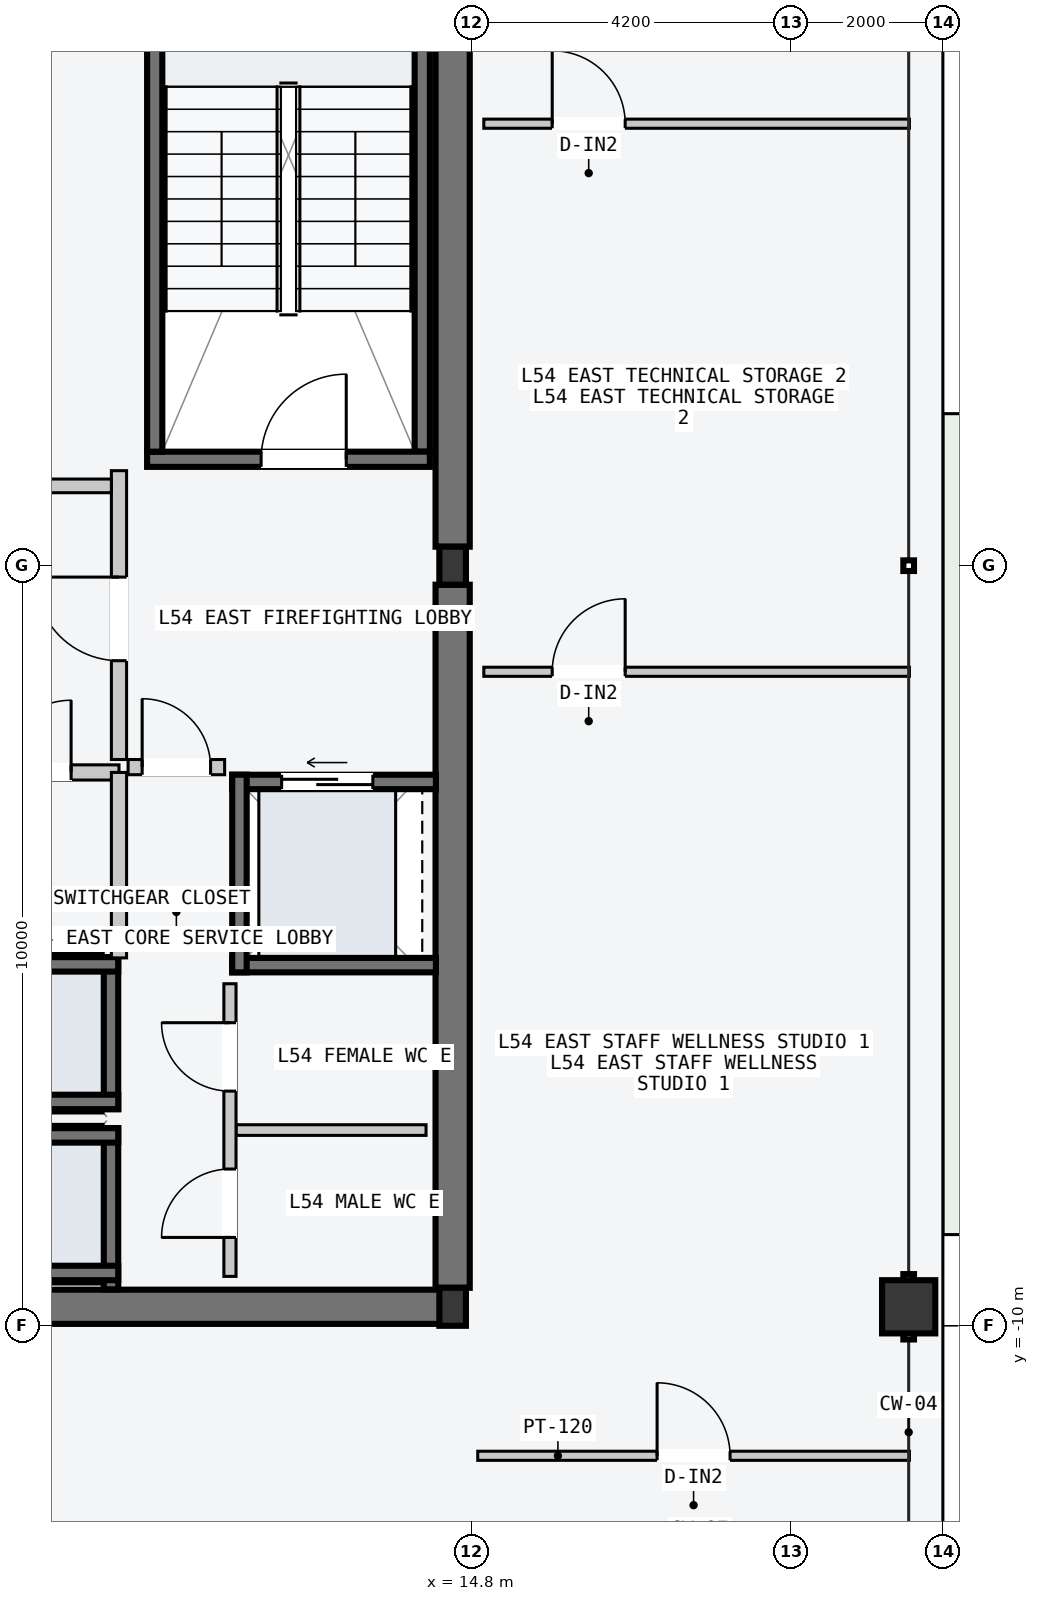
"""IFC4 building model, lengths in metres.
Left out: names, types, materials, properties, quantities, classifications, styles, units other than length and angle.
Written with IfcOpenShell. Run it as: python <this file> out.ifc"""

import sys

from ifc_helpers import new_model, si_unit, direction, frame, frame_2d, origin, origin_2d, place, context, subcontext, project, spatial, rectangle, hollow_rectangle, i_section, extrude, element, fill, save


model = new_model("IFC4")
c1 = context("Model", 3, precision=1e-05, world=origin(), true_north=direction((0.0, 1.0)))
c2 = subcontext(c1, "Body", "Model", "MODEL_VIEW")
j1 = project(units=[si_unit("LENGTHUNIT", "METRE"), si_unit("PLANEANGLEUNIT", "RADIAN")], contexts=[c1])
p1 = place(None, origin())
s1 = spatial("IfcSite", under=j1, at=p1, CompositionType="ELEMENT")
p2 = place(p1, origin())
s2 = spatial("IfcBuilding", under=s1, at=p2, CompositionType="ELEMENT")
p3 = place(p2, frame((0.0, 0.0, 205.5)))
s3 = spatial("IfcBuildingStorey", under=s2, at=p3, CompositionType="ELEMENT", Elevation=205.5)
p4 = place(p3, frame((8.07, -9.75, -0.2), z_axis=(0.0, 0.0, 1.0), x_axis=(1.0, 0.0, 0.0)))
e1 = element("IfcWall", 1, at=p4, inside=s3, PredefinedType="SHEAR", context=c2, shape_type="SweptSolid", body=[
    extrude(rectangle(XDim=6.46, YDim=0.45, at=frame_2d((3.23, 0.0))), origin(), (0.0, 0.0, 1.0), 3.6),
])
for number, where, z_axis, x_axis in (
    (2, (14.55, -9.5, -0.2), (0.0, 0.0, 1.0), (0.0, 1.0, 0.0)),
    (3, (14.55, 0.25, -0.2), (0.0, 0.0, 1.0), (0.0, 1.0, 0.0)),
):
    element("IfcWall", number, at=place(p3, frame(where, z_axis=z_axis, x_axis=x_axis)), inside=s3, PredefinedType="SHEAR", context=c2, shape_type="SweptSolid", body=[
        extrude(rectangle(XDim=9.25, YDim=0.45, at=frame_2d((4.625, 0.0))), origin(), (0.0, 0.0, 1.0), 3.6),
    ])
p5 = place(p3, frame((14.15, 1.5, -0.2), z_axis=(0.0, 0.0, 1.0), x_axis=(0.0, 1.0, 0.0)))
e4 = element("IfcWall", 4, at=p5, inside=s3, PredefinedType="SOLIDWALL", context=c2, shape_type="SweptSolid", body=[
    extrude(rectangle(XDim=7.8, YDim=0.2, at=frame_2d((3.9, 0.0))), origin(), (0.0, 0.0, 1.0), 3.6),
])
p6 = place(p3, frame((10.53, 1.4, -0.2), z_axis=(0.0, 0.0, 1.0), x_axis=(1.0, 0.0, 0.0)))
e5 = element("IfcWall", 5, at=p6, inside=s3, PredefinedType="SOLIDWALL", context=c2, shape_type="SweptSolid", body=[
    extrude(rectangle(XDim=3.72, YDim=0.2, at=frame_2d((1.86, 0.0))), origin(), (0.0, 0.0, 1.0), 3.6),
])
p7 = place(p6, frame((1.5, 0.0, 0.2)))
e6 = element("IfcOpeningElement", 6, at=p7, cuts=e5, PredefinedType="OPENING", context=c2, shape_type="SweptSolid", body=[
    extrude(rectangle(XDim=1.12, YDim=2.18, at=frame_2d((0.56, 1.09))), frame((0.0, 0.11, 0.0), z_axis=(0.0, -1.0, 0.0), x_axis=(1.0, 0.0, 0.0)), (0.0, 0.0, 1.0), 0.22),
])
p8 = place(p3, frame((10.63, 1.5, -0.2), z_axis=(0.0, 0.0, 1.0), x_axis=(0.0, 1.0, 0.0)))
e7 = element("IfcWall", 7, at=p8, inside=s3, PredefinedType="SOLIDWALL", context=c2, shape_type="SweptSolid", body=[
    extrude(rectangle(XDim=7.8, YDim=0.2, at=frame_2d((3.9, 0.0))), origin(), (0.0, 0.0, 1.0), 3.6),
])
for number, where, z_axis, x_axis in (
    (8, (14.55, -9.75, 0.0), (0.0, 0.0, 1.0), (1.0, 0.0, 0.0)),
    (9, (14.55, 0.0, 0.0), (0.0, 0.0, 1.0), (1.0, 0.0, 0.0)),
):
    element("IfcColumn", number, at=place(p3, frame(where, z_axis=z_axis, x_axis=x_axis)), inside=s3, PredefinedType="COLUMN", context=c2, shape_type="SweptSolid", body=[
        extrude(i_section(OverallWidth=0.35, OverallDepth=0.5, WebThickness=0.02, FlangeThickness=0.032, at=origin_2d()), origin(), (0.0, 0.0, 1.0), 3.6),
    ])
p9 = place(p3, frame((20.55, -9.75, 0.0), z_axis=(0.0, 0.0, 1.0), x_axis=(0.0, 1.0, 0.0)))
e10 = element("IfcColumn", 10, at=p9, inside=s3, PredefinedType="COLUMN", context=c2, shape_type="SweptSolid", body=[
    extrude(hollow_rectangle(XDim=0.7, YDim=0.7, WallThickness=0.03, at=origin_2d()), origin(), (0.0, 0.0, 1.0), 3.6),
])
p10 = place(p3, frame((10.055, -9.52, -0.2), z_axis=(0.0, 0.0, 1.0), x_axis=(0.0, 1.0, 0.0)))
e11 = element("IfcWall", 11, at=p10, inside=s3, PredefinedType="SOLIDWALL", context=c2, shape_type="SweptSolid", body=[
    extrude(rectangle(XDim=2.12, YDim=0.19, at=frame_2d((1.06, 0.0))), origin(), (0.0, 0.0, 1.0), 3.6),
])
for number, where, z_axis, x_axis in (
    (12, (7.95, -7.495, -0.2), (0.0, 0.0, 1.0), (1.0, 0.0, 0.0)),
    (13, (7.95, -9.305, -0.2), (0.0, 0.0, 1.0), (1.0, 0.0, 0.0)),
):
    element("IfcWall", number, at=place(p3, frame(where, z_axis=z_axis, x_axis=x_axis)), inside=s3, PredefinedType="SOLIDWALL", context=c2, shape_type="SweptSolid", body=[
        extrude(rectangle(XDim=2.2, YDim=0.19, at=frame_2d((1.1, 0.0))), origin(), (0.0, 0.0, 1.0), 3.6),
    ])
p11 = place(p3, frame((10.055, -7.15, -0.2), z_axis=(0.0, 0.0, 1.0), x_axis=(0.0, 1.0, 0.0)))
e14 = element("IfcWall", 14, at=p11, inside=s3, PredefinedType="SOLIDWALL", context=c2, shape_type="SweptSolid", body=[
    extrude(rectangle(XDim=2.0, YDim=0.19, at=frame_2d((1.0, 0.0))), origin(), (0.0, 0.0, 1.0), 3.6),
])
for number, where, z_axis, x_axis in (
    (15, (7.95, -5.245, -0.2), (0.0, 0.0, 1.0), (1.0, 0.0, 0.0)),
    (16, (7.95, -7.055, -0.2), (0.0, 0.0, 1.0), (1.0, 0.0, 0.0)),
):
    element("IfcWall", number, at=place(p3, frame(where, z_axis=z_axis, x_axis=x_axis)), inside=s3, PredefinedType="SOLIDWALL", context=c2, shape_type="SweptSolid", body=[
        extrude(rectangle(XDim=2.2, YDim=0.19, at=frame_2d((1.1, 0.0))), origin(), (0.0, 0.0, 1.0), 3.6),
    ])
p12 = place(p3, frame((11.65, -2.845, -0.2), z_axis=(0.0, 0.0, 1.0), x_axis=(1.0, 0.0, 0.0)))
e17 = element("IfcWall", 17, at=p12, inside=s3, PredefinedType="SOLIDWALL", context=c2, shape_type="SweptSolid", body=[
    extrude(rectangle(XDim=2.68, YDim=0.19, at=frame_2d((1.34, 0.0))), origin(), (0.0, 0.0, 1.0), 3.6),
])
p13 = place(p12, frame((0.65, 0.0, 0.2)))
e18 = element("IfcOpeningElement", 18, at=p13, cuts=e17, PredefinedType="OPENING", context=c2, shape_type="SweptSolid", body=[
    extrude(rectangle(XDim=1.2, YDim=2.2, at=frame_2d((0.6, 1.1))), frame((0.0, 0.105, 0.0), z_axis=(0.0, -1.0, 0.0), x_axis=(1.0, 0.0, 0.0)), (0.0, 0.0, 1.0), 0.21),
])
p14 = place(p3, frame((11.65, -5.255, -0.2), z_axis=(0.0, 0.0, 1.0), x_axis=(1.0, 0.0, 0.0)))
e19 = element("IfcWall", 19, at=p14, inside=s3, PredefinedType="SOLIDWALL", context=c2, shape_type="SweptSolid", body=[
    extrude(rectangle(XDim=2.68, YDim=0.19, at=frame_2d((1.34, 0.0))), origin(), (0.0, 0.0, 1.0), 3.6),
])
p15 = place(p3, frame((11.745, -5.35, -0.2), z_axis=(0.0, 0.0, 1.0), x_axis=(0.0, 1.0, 0.0)))
e20 = element("IfcWall", 20, at=p15, inside=s3, PredefinedType="SOLIDWALL", context=c2, shape_type="SweptSolid", body=[
    extrude(rectangle(XDim=2.6, YDim=0.19, at=frame_2d((1.3, 0.0))), origin(), (0.0, 0.0, 1.0), 3.6),
])
p16 = place(p3, frame((10.16, -2.55, 0.0), z_axis=(0.0, 0.0, 1.0), x_axis=(0.0, 1.0, 0.0)))
e21 = element("IfcWall", 21, at=p16, inside=s3, PredefinedType="PARTITIONING", context=c2, shape_type="SweptSolid", body=[
    extrude(rectangle(XDim=3.8, YDim=0.2, at=frame_2d((1.9, 0.0))), origin(), (0.0, 0.0, 1.0), 3.4),
])
p17 = place(p16, frame((1.3, 0.0, 0.0)))
e22 = element("IfcOpeningElement", 22, at=p17, cuts=e21, PredefinedType="OPENING", context=c2, shape_type="SweptSolid", body=[
    extrude(rectangle(XDim=1.1, YDim=2.15, at=frame_2d((0.55, 1.075))), frame((0.0, 0.11, 0.0), z_axis=(0.0, -1.0, 0.0), x_axis=(1.0, 0.0, 0.0)), (0.0, 0.0, 1.0), 0.22),
])
p18 = place(p3, frame((10.28, -2.65, 0.0), z_axis=(0.0, 0.0, 1.0), x_axis=(1.0, 0.0, 0.0)))
e23 = element("IfcWall", 23, at=p18, inside=s3, PredefinedType="PARTITIONING", context=c2, shape_type="SweptSolid", body=[
    extrude(rectangle(XDim=1.27, YDim=0.2, at=frame_2d((0.635, 0.0))), origin(), (0.0, 0.0, 1.0), 3.4),
])
p19 = place(p18, frame((0.185, 0.0, 0.0)))
e24 = element("IfcOpeningElement", 24, at=p19, cuts=e23, PredefinedType="OPENING", context=c2, shape_type="SweptSolid", body=[
    extrude(rectangle(XDim=0.9, YDim=2.15, at=frame_2d((0.45, 1.075))), frame((0.0, 0.11, 0.0), z_axis=(0.0, -1.0, 0.0), x_axis=(1.0, 0.0, 0.0)), (0.0, 0.0, 1.0), 0.22),
])
p20 = place(p3, frame((7.96, -2.72, 0.0), z_axis=(0.0, 0.0, 1.0), x_axis=(1.0, 0.0, 0.0)))
e25 = element("IfcWall", 25, at=p20, inside=s3, PredefinedType="PARTITIONING", context=c2, shape_type="SweptSolid", body=[
    extrude(rectangle(XDim=2.2, YDim=0.2, at=frame_2d((1.1, 0.0))), origin(), (0.0, 0.0, 1.0), 3.4),
])
p21 = place(p20, frame((0.62, 0.0, 0.0)))
e26 = element("IfcOpeningElement", 26, at=p21, cuts=e25, PredefinedType="OPENING", context=c2, shape_type="SweptSolid", body=[
    extrude(rectangle(XDim=0.95, YDim=2.1, at=frame_2d((0.475, 1.05))), frame((0.0, 0.11, 0.0), z_axis=(0.0, -1.0, 0.0), x_axis=(1.0, 0.0, 0.0)), (0.0, 0.0, 1.0), 0.22),
])
p22 = place(p3, frame((10.16, -5.16, 0.0), z_axis=(0.0, 0.0, 1.0), x_axis=(0.0, 1.0, 0.0)))
e27 = element("IfcWall", 27, at=p22, inside=s3, PredefinedType="PARTITIONING", context=c2, shape_type="SweptSolid", body=[
    extrude(rectangle(XDim=2.44, YDim=0.2, at=frame_2d((1.22, 0.0))), origin(), (0.0, 0.0, 1.0), 3.4),
])
p23 = place(p3, frame((11.7, -7.425, 0.0), z_axis=(0.0, 0.0, 1.0), x_axis=(1.0, 0.0, 0.0)))
e28 = element("IfcWall", 28, at=p23, inside=s3, PredefinedType="PARTITIONING", context=c2, shape_type="SweptSolid", body=[
    extrude(rectangle(XDim=2.5, YDim=0.14, at=frame_2d((1.25, 0.0))), origin(), (0.0, 0.0, 1.0), 3.4),
])
p24 = place(p3, frame((11.62, -9.35, 0.0), z_axis=(0.0, 0.0, 1.0), x_axis=(0.0, 1.0, 0.0)))
e29 = element("IfcWall", 29, at=p24, inside=s3, PredefinedType="PARTITIONING", context=c2, shape_type="SweptSolid", body=[
    extrude(rectangle(XDim=3.85, YDim=0.16, at=frame_2d((1.925, 0.0))), origin(), (0.0, 0.0, 1.0), 3.4),
])
p25 = place(p24, frame((0.512, 0.0, 0.0)))
e30 = element("IfcOpeningElement", 30, at=p25, cuts=e29, PredefinedType="OPENING", context=c2, shape_type="SweptSolid", body=[
    extrude(rectangle(XDim=0.9, YDim=2.15, at=frame_2d((0.45, 1.075))), frame((0.0, 0.09, 0.0), z_axis=(0.0, -1.0, 0.0), x_axis=(1.0, 0.0, 0.0)), (0.0, 0.0, 1.0), 0.18),
])
p26 = place(p24, frame((2.438, 0.0, 0.0)))
e31 = element("IfcOpeningElement", 31, at=p26, cuts=e29, PredefinedType="OPENING", context=c2, shape_type="SweptSolid", body=[
    extrude(rectangle(XDim=0.9, YDim=2.15, at=frame_2d((0.45, 1.075))), frame((0.0, 0.09, 0.0), z_axis=(0.0, -1.0, 0.0), x_axis=(1.0, 0.0, 0.0)), (0.0, 0.0, 1.0), 0.18),
])
p27 = place(p3, frame((1.26, 1.05, 0.0), z_axis=(0.0, 0.0, 1.0), x_axis=(1.0, 0.0, 0.0)))
e32 = element("IfcWall", 32, at=p27, inside=s3, PredefinedType="PARTITIONING", context=c2, shape_type="SweptSolid", body=[
    extrude(rectangle(XDim=8.8, YDim=0.18, at=frame_2d((4.4, 0.0))), origin(), (0.0, 0.0, 1.0), 3.4),
])
p28 = place(p3, frame((14.88, -11.71, 0.0), z_axis=(0.0, 0.0, 1.0), x_axis=(1.0, 0.0, 0.0)))
e33 = element("IfcWall", 33, at=p28, inside=s3, PredefinedType="PARTITIONING", context=c2, shape_type="SweptSolid", body=[
    extrude(rectangle(XDim=5.68, YDim=0.12, at=frame_2d((2.84, 0.0))), origin(), (0.0, 0.0, 1.0), 3.4),
])
p29 = place(p28, frame((2.36, 0.0, 0.0)))
e34 = element("IfcOpeningElement", 34, at=p29, cuts=e33, PredefinedType="OPENING", context=c2, shape_type="SweptSolid", body=[
    extrude(rectangle(XDim=0.96, YDim=2.18, at=frame_2d((0.48, 1.09))), frame((0.0, 0.07, 0.0), z_axis=(0.0, -1.0, 0.0), x_axis=(1.0, 0.0, 0.0)), (0.0, 0.0, 1.0), 0.14),
])
p30 = place(p3, frame((14.96, -1.396, 0.0), z_axis=(0.0, 0.0, 1.0), x_axis=(1.0, 0.0, 0.0)))
e35 = element("IfcWall", 35, at=p30, inside=s3, PredefinedType="PARTITIONING", context=c2, shape_type="SweptSolid", body=[
    extrude(rectangle(XDim=5.6, YDim=0.12, at=frame_2d((2.8, 0.0))), origin(), (0.0, 0.0, 1.0), 3.4),
])
p31 = place(p30, frame((0.9, 0.0, 0.0)))
e36 = element("IfcOpeningElement", 36, at=p31, cuts=e35, PredefinedType="OPENING", context=c2, shape_type="SweptSolid", body=[
    extrude(rectangle(XDim=0.96, YDim=2.18, at=frame_2d((0.48, 1.09))), frame((0.0, 0.07, 0.0), z_axis=(0.0, -1.0, 0.0), x_axis=(1.0, 0.0, 0.0)), (0.0, 0.0, 1.0), 0.14),
])
p32 = place(p3, frame((14.96, 5.815, 0.0), z_axis=(0.0, 0.0, 1.0), x_axis=(1.0, 0.0, 0.0)))
e37 = element("IfcWall", 37, at=p32, inside=s3, PredefinedType="PARTITIONING", context=c2, shape_type="SweptSolid", body=[
    extrude(rectangle(XDim=5.6, YDim=0.12, at=frame_2d((2.8, 0.0))), origin(), (0.0, 0.0, 1.0), 3.4),
])
p33 = place(p32, frame((0.9, 0.0, 0.0)))
e38 = element("IfcOpeningElement", 38, at=p33, cuts=e37, PredefinedType="OPENING", context=c2, shape_type="SweptSolid", body=[
    extrude(rectangle(XDim=0.96, YDim=2.18, at=frame_2d((0.48, 1.09))), frame((0.0, 0.07, 0.0), z_axis=(0.0, -1.0, 0.0), x_axis=(1.0, 0.0, 0.0)), (0.0, 0.0, 1.0), 0.14),
])
p34 = place(p7, origin())
e39 = element("IfcDoor", 39, at=p34, inside=s3, OperationType="SINGLE_SWING_RIGHT", PredefinedType="DOOR", context=c2, shape_type="SweptSolid", body=[
    extrude(rectangle(XDim=1.12, YDim=2.18, at=frame_2d((0.56, 1.09))), frame((0.0, 0.025, 0.0), z_axis=(0.0, -1.0, 0.0), x_axis=(1.0, 0.0, 0.0)), (0.0, 0.0, 1.0), 0.05),
])
fill(e6, e39)
p35 = place(p13, origin())
e40 = element("IfcDoor", 40, at=p35, inside=s3, OperationType="SLIDING_TO_LEFT", PredefinedType="DOOR", context=c2, shape_type="SweptSolid", body=[
    extrude(rectangle(XDim=1.2, YDim=2.2, at=frame_2d((0.6, 1.1))), frame((0.0, 0.025, 0.0), z_axis=(0.0, -1.0, 0.0), x_axis=(1.0, 0.0, 0.0)), (0.0, 0.0, 1.0), 0.05),
])
fill(e18, e40)
p36 = place(p17, origin())
e41 = element("IfcDoor", 41, at=p36, inside=s3, OperationType="SINGLE_SWING_RIGHT", PredefinedType="DOOR", context=c2, shape_type="SweptSolid", body=[
    extrude(rectangle(XDim=1.1, YDim=2.15, at=frame_2d((0.55, 1.075))), frame((0.0, 0.025, 0.0), z_axis=(0.0, -1.0, 0.0), x_axis=(1.0, 0.0, 0.0)), (0.0, 0.0, 1.0), 0.05),
])
fill(e22, e41)
p37 = place(p19, origin())
e42 = element("IfcDoor", 42, at=p37, inside=s3, OperationType="SINGLE_SWING_LEFT", PredefinedType="DOOR", context=c2, shape_type="SweptSolid", body=[
    extrude(rectangle(XDim=0.9, YDim=2.15, at=frame_2d((0.45, 1.075))), frame((0.0, 0.025, 0.0), z_axis=(0.0, -1.0, 0.0), x_axis=(1.0, 0.0, 0.0)), (0.0, 0.0, 1.0), 0.05),
])
fill(e24, e42)
p38 = place(p21, origin())
e43 = element("IfcDoor", 43, at=p38, inside=s3, OperationType="SINGLE_SWING_RIGHT", PredefinedType="DOOR", context=c2, shape_type="SweptSolid", body=[
    extrude(rectangle(XDim=0.95, YDim=2.1, at=frame_2d((0.475, 1.05))), frame((0.0, 0.025, 0.0), z_axis=(0.0, -1.0, 0.0), x_axis=(1.0, 0.0, 0.0)), (0.0, 0.0, 1.0), 0.05),
])
fill(e26, e43)
p39 = place(p25, origin())
e44 = element("IfcDoor", 44, at=p39, inside=s3, OperationType="SINGLE_SWING_LEFT", PredefinedType="DOOR", context=c2, shape_type="SweptSolid", body=[
    extrude(rectangle(XDim=0.9, YDim=2.15, at=frame_2d((0.45, 1.075))), frame((0.0, 0.025, 0.0), z_axis=(0.0, -1.0, 0.0), x_axis=(1.0, 0.0, 0.0)), (0.0, 0.0, 1.0), 0.05),
])
fill(e30, e44)
p40 = place(p26, origin())
e45 = element("IfcDoor", 45, at=p40, inside=s3, OperationType="SINGLE_SWING_RIGHT", PredefinedType="DOOR", context=c2, shape_type="SweptSolid", body=[
    extrude(rectangle(XDim=0.9, YDim=2.15, at=frame_2d((0.45, 1.075))), frame((0.0, 0.025, 0.0), z_axis=(0.0, -1.0, 0.0), x_axis=(1.0, 0.0, 0.0)), (0.0, 0.0, 1.0), 0.05),
])
fill(e31, e45)
p41 = place(p29, origin())
e46 = element("IfcDoor", 46, at=p41, inside=s3, OperationType="SINGLE_SWING_LEFT", PredefinedType="DOOR", context=c2, shape_type="SweptSolid", body=[
    extrude(rectangle(XDim=0.96, YDim=2.18, at=frame_2d((0.48, 1.09))), frame((0.0, 0.025, 0.0), z_axis=(0.0, -1.0, 0.0), x_axis=(1.0, 0.0, 0.0)), (0.0, 0.0, 1.0), 0.05),
])
fill(e34, e46)
p42 = place(p31, origin())
e47 = element("IfcDoor", 47, at=p42, inside=s3, OperationType="SINGLE_SWING_RIGHT", PredefinedType="DOOR", context=c2, shape_type="SweptSolid", body=[
    extrude(rectangle(XDim=0.96, YDim=2.18, at=frame_2d((0.48, 1.09))), frame((0.0, 0.025, 0.0), z_axis=(0.0, -1.0, 0.0), x_axis=(1.0, 0.0, 0.0)), (0.0, 0.0, 1.0), 0.05),
])
fill(e36, e47)
p43 = place(p33, origin())
e48 = element("IfcDoor", 48, at=p43, inside=s3, OperationType="SINGLE_SWING_LEFT", PredefinedType="DOOR", context=c2, shape_type="SweptSolid", body=[
    extrude(rectangle(XDim=0.96, YDim=2.18, at=frame_2d((0.48, 1.09))), frame((0.0, 0.025, 0.0), z_axis=(0.0, -1.0, 0.0), x_axis=(1.0, 0.0, 0.0)), (0.0, 0.0, 1.0), 0.05),
])
fill(e38, e48)
save(model, sys.argv[1])
